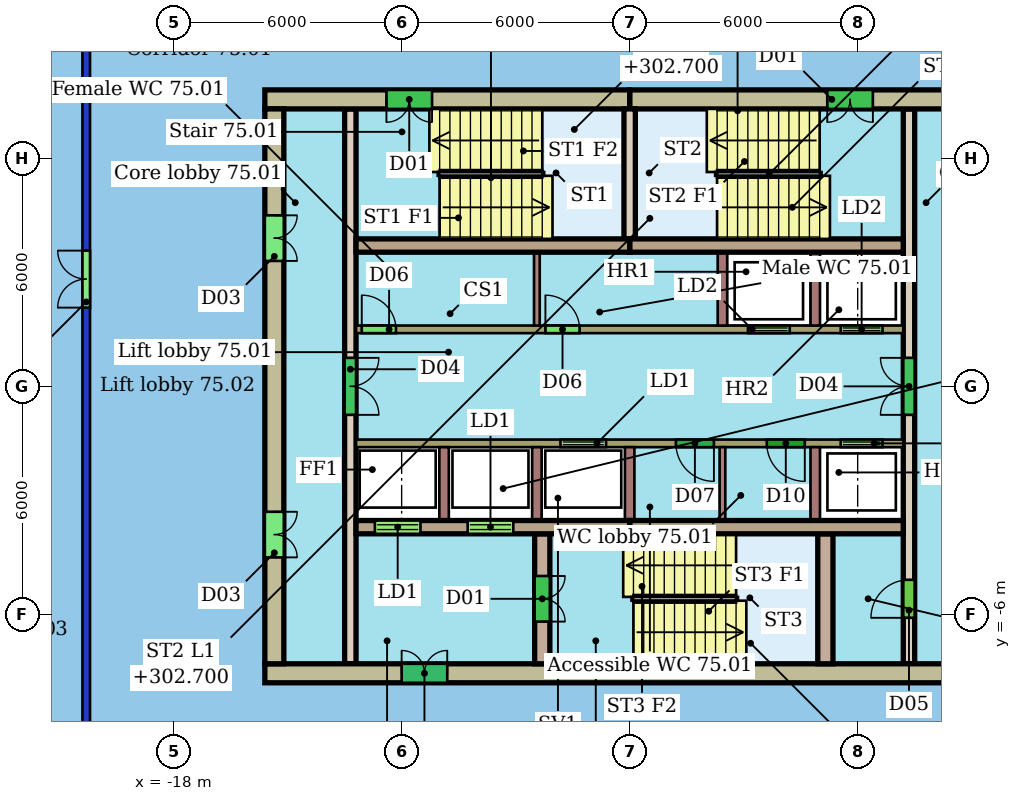
"""IFC4 building model, lengths in metres.
Left out: names, types, materials, properties, quantities, classifications, styles, units other than length and angle.
Written with IfcOpenShell. Run it as: python <this file> out.ifc"""

import sys

from ifc_helpers import new_model, si_unit, direction, frame, frame_2d, origin, place, context, subcontext, project, spatial, rectangle, extrude, element, fill, save


model = new_model("IFC4")
c1 = context("Model", 3, precision=1e-05, world=origin(), true_north=direction((0.0, 1.0)))
c2 = subcontext(c1, "Body", "Model", "MODEL_VIEW")
j1 = project(units=[si_unit("LENGTHUNIT", "METRE"), si_unit("PLANEANGLEUNIT", "RADIAN")], contexts=[c1])
p1 = place(None, origin())
s1 = spatial("IfcSite", under=j1, at=p1, CompositionType="ELEMENT")
p2 = place(p1, origin())
s2 = spatial("IfcBuilding", under=s1, at=p2, CompositionType="ELEMENT")
p3 = place(p2, frame((0.0, 0.0, 300.9)))
s3 = spatial("IfcBuildingStorey", under=s2, at=p3, CompositionType="ELEMENT", Elevation=300.9)
p4 = place(p3, frame((-20.3, -9.8, 0.0), z_axis=(0.0, 0.0, 1.0), x_axis=(0.0, 1.0, 0.0)))
e1 = element("IfcWall", 1, at=p4, inside=s3, PredefinedType="PARTITIONING", context=c2, shape_type="SweptSolid", body=[
    extrude(rectangle(XDim=19.6, YDim=0.2, at=frame_2d((9.8, 0.0))), origin(), (0.0, 0.0, 1.0), 3.05),
])
p5 = place(p4, frame((11.872, 0.0, 0.0)))
e2 = element("IfcOpeningElement", 2, at=p5, cuts=e1, PredefinedType="OPENING", context=c2, shape_type="SweptSolid", body=[
    extrude(rectangle(XDim=1.5, YDim=2.4, at=frame_2d((0.75, 1.2))), frame((0.0, 0.11, 0.0), z_axis=(0.0, -1.0, 0.0), x_axis=(1.0, 0.0, 0.0)), (0.0, 0.0, 1.0), 0.22),
])
p6 = place(p3, frame((3.6, 7.55, 0.0), z_axis=(0.0, 0.0, 1.0), x_axis=(-1.0, 0.0, 0.0)))
e3 = element("IfcWall", 3, at=p6, inside=s3, PredefinedType="SHEAR", context=c2, shape_type="SweptSolid", body=[
    extrude(rectangle(XDim=9.6, YDim=0.5, at=frame_2d((4.8, 0.0))), origin(), (0.0, 0.0, 1.0), 3.3),
])
p7 = place(p6, frame((3.2, 0.0, 0.0)))
e4 = element("IfcOpeningElement", 4, at=p7, cuts=e3, PredefinedType="OPENING", context=c2, shape_type="SweptSolid", body=[
    extrude(rectangle(XDim=1.2, YDim=2.1, at=frame_2d((0.6, 1.05))), frame((0.0, 0.26, 0.0), z_axis=(0.0, -1.0, 0.0), x_axis=(1.0, 0.0, 0.0)), (0.0, 0.0, 1.0), 0.52),
])
p8 = place(p3, frame((-6.0, 7.55, 0.0), z_axis=(0.0, 0.0, 1.0), x_axis=(-1.0, 0.0, 0.0)))
e5 = element("IfcWall", 5, at=p8, inside=s3, PredefinedType="SHEAR", context=c2, shape_type="SweptSolid", body=[
    extrude(rectangle(XDim=9.6, YDim=0.5, at=frame_2d((4.8, 0.0))), origin(), (0.0, 0.0, 1.0), 3.3),
])
p9 = place(p8, frame((5.2, 0.0, 0.0)))
e6 = element("IfcOpeningElement", 6, at=p9, cuts=e5, PredefinedType="OPENING", context=c2, shape_type="SweptSolid", body=[
    extrude(rectangle(XDim=1.2, YDim=2.1, at=frame_2d((0.6, 1.05))), frame((0.0, 0.26, 0.0), z_axis=(0.0, -1.0, 0.0), x_axis=(1.0, 0.0, 0.0)), (0.0, 0.0, 1.0), 0.52),
])
p10 = place(p3, frame((-15.6, -7.55, 0.0), z_axis=(0.0, 0.0, 1.0), x_axis=(1.0, 0.0, 0.0)))
e7 = element("IfcWall", 7, at=p10, inside=s3, PredefinedType="SHEAR", context=c2, shape_type="SweptSolid", body=[
    extrude(rectangle(XDim=19.2, YDim=0.5, at=frame_2d((9.6, 0.0))), origin(), (0.0, 0.0, 1.0), 3.3),
])
p11 = place(p10, frame((3.6, 0.0, 0.0)))
e8 = element("IfcOpeningElement", 8, at=p11, cuts=e7, PredefinedType="OPENING", context=c2, shape_type="SweptSolid", body=[
    extrude(rectangle(XDim=1.2, YDim=2.1, at=frame_2d((0.6, 1.05))), frame((0.0, 0.26, 0.0), z_axis=(0.0, -1.0, 0.0), x_axis=(1.0, 0.0, 0.0)), (0.0, 0.0, 1.0), 0.52),
])
p12 = place(p3, frame((-15.35, 7.3, 0.0), z_axis=(0.0, 0.0, 1.0), x_axis=(0.0, -1.0, 0.0)))
e9 = element("IfcWall", 9, at=p12, inside=s3, PredefinedType="SHEAR", context=c2, shape_type="SweptSolid", body=[
    extrude(rectangle(XDim=14.6, YDim=0.5, at=frame_2d((7.3, 0.0))), origin(), (0.0, 0.0, 1.0), 3.3),
])
p13 = place(p12, frame((10.6, 0.0, 0.0)))
e10 = element("IfcOpeningElement", 10, at=p13, cuts=e9, PredefinedType="OPENING", context=c2, shape_type="SweptSolid", body=[
    extrude(rectangle(XDim=1.2, YDim=2.1, at=frame_2d((0.6, 1.05))), frame((0.0, 0.26, 0.0), z_axis=(0.0, -1.0, 0.0), x_axis=(1.0, 0.0, 0.0)), (0.0, 0.0, 1.0), 0.52),
])
p14 = place(p12, frame((2.8, 0.0, 0.0)))
e11 = element("IfcOpeningElement", 11, at=p14, cuts=e9, PredefinedType="OPENING", context=c2, shape_type="SweptSolid", body=[
    extrude(rectangle(XDim=1.2, YDim=2.1, at=frame_2d((0.6, 1.05))), frame((0.0, 0.26, 0.0), z_axis=(0.0, -1.0, 0.0), x_axis=(1.0, 0.0, 0.0)), (0.0, 0.0, 1.0), 0.52),
])
for number, where, z_axis, x_axis in (
    (12, (-13.2, 3.705, 0.0), (0.0, 0.0, 1.0), (1.0, 0.0, 0.0)),
    (13, (-6.0, 3.705, 0.0), (0.0, 0.0, 1.0), (1.0, 0.0, 0.0)),
):
    element("IfcWall", number, at=place(p3, frame(where, z_axis=z_axis, x_axis=x_axis)), inside=s3, PredefinedType="SHEAR", context=c2, shape_type="SweptSolid", body=[
        extrude(rectangle(XDim=7.2, YDim=0.35, at=frame_2d((3.6, 0.0))), origin(), (0.0, 0.0, 1.0), 3.3),
    ])
p15 = place(p3, frame((-13.2, -3.705, 0.0), z_axis=(0.0, 0.0, 1.0), x_axis=(1.0, 0.0, 0.0)))
e14 = element("IfcWall", 14, at=p15, inside=s3, PredefinedType="SHEAR", context=c2, shape_type="SweptSolid", body=[
    extrude(rectangle(XDim=7.2, YDim=0.35, at=frame_2d((3.6, 0.0))), origin(), (0.0, 0.0, 1.0), 3.3),
])
p16 = place(p15, frame((0.496, 0.0, 0.0)))
e15 = element("IfcOpeningElement", 15, at=p16, cuts=e14, PredefinedType="OPENING", context=c2, shape_type="SweptSolid", body=[
    extrude(rectangle(XDim=1.2, YDim=2.1, at=frame_2d((0.6, 1.05))), frame((0.0, 0.185, 0.0), z_axis=(0.0, -1.0, 0.0), x_axis=(1.0, 0.0, 0.0)), (0.0, 0.0, 1.0), 0.37),
])
p17 = place(p15, frame((2.938, 0.0, 0.0)))
e16 = element("IfcOpeningElement", 16, at=p17, cuts=e14, PredefinedType="OPENING", context=c2, shape_type="SweptSolid", body=[
    extrude(rectangle(XDim=1.2, YDim=2.1, at=frame_2d((0.6, 1.05))), frame((0.0, 0.185, 0.0), z_axis=(0.0, -1.0, 0.0), x_axis=(1.0, 0.0, 0.0)), (0.0, 0.0, 1.0), 0.37),
])
p18 = place(p3, frame((-6.0, -3.705, 0.0), z_axis=(0.0, 0.0, 1.0), x_axis=(1.0, 0.0, 0.0)))
e17 = element("IfcWall", 17, at=p18, inside=s3, PredefinedType="SHEAR", context=c2, shape_type="SweptSolid", body=[
    extrude(rectangle(XDim=7.2, YDim=0.35, at=frame_2d((3.6, 0.0))), origin(), (0.0, 0.0, 1.0), 3.3),
])
p19 = place(p3, frame((-13.35, 7.3, 0.0), z_axis=(0.0, 0.0, 1.0), x_axis=(0.0, -1.0, 0.0)))
e18 = element("IfcWall", 18, at=p19, inside=s3, PredefinedType="SHEAR", context=c2, shape_type="SweptSolid", body=[
    extrude(rectangle(XDim=14.6, YDim=0.3, at=frame_2d((7.3, 0.0))), origin(), (0.0, 0.0, 1.0), 3.3),
])
p20 = place(p19, frame((6.55, 0.0, 0.0)))
e19 = element("IfcOpeningElement", 19, at=p20, cuts=e18, PredefinedType="OPENING", context=c2, shape_type="SweptSolid", body=[
    extrude(rectangle(XDim=1.5, YDim=2.1, at=frame_2d((0.75, 1.05))), frame((0.0, 0.16, 0.0), z_axis=(0.0, -1.0, 0.0), x_axis=(1.0, 0.0, 0.0)), (0.0, 0.0, 1.0), 0.32),
])
p21 = place(p3, frame((1.35, -7.3, 0.0), z_axis=(0.0, 0.0, 1.0), x_axis=(0.0, 1.0, 0.0)))
e20 = element("IfcWall", 20, at=p21, inside=s3, PredefinedType="SHEAR", context=c2, shape_type="SweptSolid", body=[
    extrude(rectangle(XDim=14.6, YDim=0.3, at=frame_2d((7.3, 0.0))), origin(), (0.0, 0.0, 1.0), 3.3),
])
p22 = place(p21, frame((1.21, 0.0, 0.0)))
e21 = element("IfcOpeningElement", 21, at=p22, cuts=e20, PredefinedType="OPENING", context=c2, shape_type="SweptSolid", body=[
    extrude(rectangle(XDim=1.0, YDim=2.1, at=frame_2d((0.5, 1.05))), frame((0.0, 0.16, 0.0), z_axis=(0.0, -1.0, 0.0), x_axis=(1.0, 0.0, 0.0)), (0.0, 0.0, 1.0), 0.32),
])
p23 = place(p21, frame((6.55, 0.0, 0.0)))
e22 = element("IfcOpeningElement", 22, at=p23, cuts=e20, PredefinedType="OPENING", context=c2, shape_type="SweptSolid", body=[
    extrude(rectangle(XDim=1.5, YDim=2.1, at=frame_2d((0.75, 1.05))), frame((0.0, 0.16, 0.0), z_axis=(0.0, -1.0, 0.0), x_axis=(1.0, 0.0, 0.0)), (0.0, 0.0, 1.0), 0.32),
])
p24 = place(p3, frame((-13.2, 1.5, 0.0), z_axis=(0.0, 0.0, 1.0), x_axis=(1.0, 0.0, 0.0)))
e23 = element("IfcWall", 23, at=p24, inside=s3, PredefinedType="SHEAR", context=c2, shape_type="SweptSolid", body=[
    extrude(rectangle(XDim=14.4, YDim=0.2, at=frame_2d((7.2, 0.0))), origin(), (0.0, 0.0, 1.0), 3.3),
])
p25 = place(p24, frame((10.312, 0.0, 0.0)))
e24 = element("IfcOpeningElement", 24, at=p25, cuts=e23, PredefinedType="OPENING", context=c2, shape_type="SweptSolid", body=[
    extrude(rectangle(XDim=1.1, YDim=2.1, at=frame_2d((0.55, 1.05))), frame((0.0, 0.11, 0.0), z_axis=(0.0, -1.0, 0.0), x_axis=(1.0, 0.0, 0.0)), (0.0, 0.0, 1.0), 0.22),
])
p26 = place(p24, frame((12.754, 0.0, 0.0)))
e25 = element("IfcOpeningElement", 25, at=p26, cuts=e23, PredefinedType="OPENING", context=c2, shape_type="SweptSolid", body=[
    extrude(rectangle(XDim=1.1, YDim=2.1, at=frame_2d((0.55, 1.05))), frame((0.0, 0.11, 0.0), z_axis=(0.0, -1.0, 0.0), x_axis=(1.0, 0.0, 0.0)), (0.0, 0.0, 1.0), 0.22),
])
p27 = place(p24, frame((0.15, 0.0, 0.0)))
e26 = element("IfcOpeningElement", 26, at=p27, cuts=e23, PredefinedType="OPENING", context=c2, shape_type="SweptSolid", body=[
    extrude(rectangle(XDim=0.9, YDim=2.1, at=frame_2d((0.45, 1.05))), frame((0.0, 0.11, 0.0), z_axis=(0.0, -1.0, 0.0), x_axis=(1.0, 0.0, 0.0)), (0.0, 0.0, 1.0), 0.22),
])
p28 = place(p24, frame((4.983, 0.0, 0.0)))
e27 = element("IfcOpeningElement", 27, at=p28, cuts=e23, PredefinedType="OPENING", context=c2, shape_type="SweptSolid", body=[
    extrude(rectangle(XDim=0.9, YDim=2.1, at=frame_2d((0.45, 1.05))), frame((0.0, 0.11, 0.0), z_axis=(0.0, -1.0, 0.0), x_axis=(1.0, 0.0, 0.0)), (0.0, 0.0, 1.0), 0.22),
])
p29 = place(p3, frame((1.2, -1.5, 0.0), z_axis=(0.0, 0.0, 1.0), x_axis=(-1.0, 0.0, 0.0)))
e28 = element("IfcWall", 28, at=p29, inside=s3, PredefinedType="SHEAR", context=c2, shape_type="SweptSolid", body=[
    extrude(rectangle(XDim=14.4, YDim=0.2, at=frame_2d((7.2, 0.0))), origin(), (0.0, 0.0, 1.0), 3.3),
])
p30 = place(p29, frame((7.821, 0.0, 0.0)))
e29 = element("IfcOpeningElement", 29, at=p30, cuts=e28, PredefinedType="OPENING", context=c2, shape_type="SweptSolid", body=[
    extrude(rectangle(XDim=1.2, YDim=2.1, at=frame_2d((0.6, 1.05))), frame((0.0, 0.11, 0.0), z_axis=(0.0, -1.0, 0.0), x_axis=(1.0, 0.0, 0.0)), (0.0, 0.0, 1.0), 0.22),
])
p31 = place(p29, frame((0.546, 0.0, 0.0)))
e30 = element("IfcOpeningElement", 30, at=p31, cuts=e28, PredefinedType="OPENING", context=c2, shape_type="SweptSolid", body=[
    extrude(rectangle(XDim=1.1, YDim=2.1, at=frame_2d((0.55, 1.05))), frame((0.0, 0.11, 0.0), z_axis=(0.0, -1.0, 0.0), x_axis=(1.0, 0.0, 0.0)), (0.0, 0.0, 1.0), 0.22),
])
p32 = place(p29, frame((4.983, 0.0, 0.0)))
e31 = element("IfcOpeningElement", 31, at=p32, cuts=e28, PredefinedType="OPENING", context=c2, shape_type="SweptSolid", body=[
    extrude(rectangle(XDim=1.0, YDim=2.1, at=frame_2d((0.5, 1.05))), frame((0.0, 0.11, 0.0), z_axis=(0.0, -1.0, 0.0), x_axis=(1.0, 0.0, 0.0)), (0.0, 0.0, 1.0), 0.22),
])
p33 = place(p29, frame((2.592, 0.0, 0.0)))
e32 = element("IfcOpeningElement", 32, at=p33, cuts=e28, PredefinedType="OPENING", context=c2, shape_type="SweptSolid", body=[
    extrude(rectangle(XDim=1.0, YDim=2.1, at=frame_2d((0.5, 1.05))), frame((0.0, 0.11, 0.0), z_axis=(0.0, -1.0, 0.0), x_axis=(1.0, 0.0, 0.0)), (0.0, 0.0, 1.0), 0.22),
])
p34 = place(p3, frame((-8.3, -3.88, 0.0), z_axis=(0.0, 0.0, 1.0), x_axis=(0.0, -1.0, 0.0)))
e33 = element("IfcWall", 33, at=p34, inside=s3, PredefinedType="SHEAR", context=c2, shape_type="SweptSolid", body=[
    extrude(rectangle(XDim=3.42, YDim=0.4, at=frame_2d((1.71, 0.0))), origin(), (0.0, 0.0, 1.0), 3.3),
])
p35 = place(p34, frame((1.11, 0.0, 0.0)))
e34 = element("IfcOpeningElement", 34, at=p35, cuts=e33, PredefinedType="OPENING", context=c2, shape_type="SweptSolid", body=[
    extrude(rectangle(XDim=1.2, YDim=2.1, at=frame_2d((0.6, 1.05))), frame((0.0, 0.21, 0.0), z_axis=(0.0, -1.0, 0.0), x_axis=(1.0, 0.0, 0.0)), (0.0, 0.0, 1.0), 0.42),
])
p36 = place(p3, frame((-0.85, -3.88, 0.0), z_axis=(0.0, 0.0, 1.0), x_axis=(0.0, -1.0, 0.0)))
e35 = element("IfcWall", 35, at=p36, inside=s3, PredefinedType="SHEAR", context=c2, shape_type="SweptSolid", body=[
    extrude(rectangle(XDim=3.42, YDim=0.4, at=frame_2d((1.71, 0.0))), origin(), (0.0, 0.0, 1.0), 3.3),
])
p37 = place(p3, frame((-6.0, 3.88, 0.0), z_axis=(0.0, 0.0, 1.0), x_axis=(0.0, 1.0, 0.0)))
e36 = element("IfcWall", 36, at=p37, inside=s3, PredefinedType="SHEAR", context=c2, shape_type="SweptSolid", body=[
    extrude(rectangle(XDim=3.42, YDim=0.3, at=frame_2d((1.71, 0.0))), origin(), (0.0, 0.0, 1.0), 3.3),
])
for number, where, z_axis, x_axis in (
    (37, (-3.558, 1.6, 0.0), (0.0, 0.0, 1.0), (0.0, 1.0, 0.0)),
    (38, (-1.117, 1.6, 0.0), (0.0, 0.0, 1.0), (0.0, 1.0, 0.0)),
):
    element("IfcWall", number, at=place(p3, frame(where, z_axis=z_axis, x_axis=x_axis)), inside=s3, PredefinedType="SHEAR", context=c2, shape_type="SweptSolid", body=[
        extrude(rectangle(XDim=1.93, YDim=0.25, at=frame_2d((0.965, 0.0))), origin(), (0.0, 0.0, 1.0), 3.3),
    ])
p38 = place(p3, frame((-8.442, 1.6, 0.0), z_axis=(0.0, 0.0, 1.0), x_axis=(0.0, 1.0, 0.0)))
e39 = element("IfcWall", 39, at=p38, inside=s3, PredefinedType="PARTITIONING", context=c2, shape_type="SweptSolid", body=[
    extrude(rectangle(XDim=1.93, YDim=0.15, at=frame_2d((0.965, 0.0))), origin(), (0.0, 0.0, 1.0), 3.3),
])
for number, where, z_axis, x_axis in (
    (40, (-10.883, -1.6, 0.0), (0.0, 0.0, 1.0), (0.0, -1.0, 0.0)),
    (41, (-8.442, -1.6, 0.0), (0.0, 0.0, 1.0), (0.0, -1.0, 0.0)),
    (42, (-6.0, -1.6, 0.0), (0.0, 0.0, 1.0), (0.0, -1.0, 0.0)),
    (43, (-1.117, -1.6, 0.0), (0.0, 0.0, 1.0), (0.0, -1.0, 0.0)),
):
    element("IfcWall", number, at=place(p3, frame(where, z_axis=z_axis, x_axis=x_axis)), inside=s3, PredefinedType="SHEAR", context=c2, shape_type="SweptSolid", body=[
        extrude(rectangle(XDim=1.93, YDim=0.25, at=frame_2d((0.965, 0.0))), origin(), (0.0, 0.0, 1.0), 3.3),
    ])
p39 = place(p3, frame((-3.558, -1.6, 0.0), z_axis=(0.0, 0.0, 1.0), x_axis=(0.0, -1.0, 0.0)))
e44 = element("IfcWall", 44, at=p39, inside=s3, PredefinedType="PARTITIONING", context=c2, shape_type="SweptSolid", body=[
    extrude(rectangle(XDim=1.93, YDim=0.15, at=frame_2d((0.965, 0.0))), origin(), (0.0, 0.0, 1.0), 3.3),
])
p40 = place(p5, origin())
e45 = element("IfcDoor", 45, at=p40, inside=s3, OperationType="DOUBLE_DOOR_SINGLE_SWING", PredefinedType="DOOR", context=c2, shape_type="SweptSolid", body=[
    extrude(rectangle(XDim=1.5, YDim=2.4, at=frame_2d((0.75, 1.2))), frame((0.0, 0.025, 0.0), z_axis=(0.0, -1.0, 0.0), x_axis=(1.0, 0.0, 0.0)), (0.0, 0.0, 1.0), 0.05),
])
fill(e2, e45)
p41 = place(p7, origin())
e46 = element("IfcDoor", 46, at=p41, inside=s3, OperationType="DOUBLE_DOOR_SINGLE_SWING", PredefinedType="NOTDEFINED", context=c2, shape_type="SweptSolid", body=[
    extrude(rectangle(XDim=1.2, YDim=2.1, at=frame_2d((0.6, 1.05))), frame((0.0, 0.025, 0.0), z_axis=(0.0, -1.0, 0.0), x_axis=(1.0, 0.0, 0.0)), (0.0, 0.0, 1.0), 0.05),
])
fill(e4, e46)
p42 = place(p9, origin())
e47 = element("IfcDoor", 47, at=p42, inside=s3, OperationType="DOUBLE_DOOR_SINGLE_SWING", PredefinedType="NOTDEFINED", context=c2, shape_type="SweptSolid", body=[
    extrude(rectangle(XDim=1.2, YDim=2.1, at=frame_2d((0.6, 1.05))), frame((0.0, 0.025, 0.0), z_axis=(0.0, -1.0, 0.0), x_axis=(1.0, 0.0, 0.0)), (0.0, 0.0, 1.0), 0.05),
])
fill(e6, e47)
p43 = place(p11, origin())
e48 = element("IfcDoor", 48, at=p43, inside=s3, OperationType="DOUBLE_DOOR_SINGLE_SWING", PredefinedType="NOTDEFINED", context=c2, shape_type="SweptSolid", body=[
    extrude(rectangle(XDim=1.2, YDim=2.1, at=frame_2d((0.6, 1.05))), frame((0.0, 0.025, 0.0), z_axis=(0.0, -1.0, 0.0), x_axis=(1.0, 0.0, 0.0)), (0.0, 0.0, 1.0), 0.05),
])
fill(e8, e48)
p44 = place(p13, origin())
e49 = element("IfcDoor", 49, at=p44, inside=s3, OperationType="DOUBLE_DOOR_SINGLE_SWING", PredefinedType="NOTDEFINED", context=c2, shape_type="SweptSolid", body=[
    extrude(rectangle(XDim=1.2, YDim=2.1, at=frame_2d((0.6, 1.05))), frame((0.0, 0.025, 0.0), z_axis=(0.0, -1.0, 0.0), x_axis=(1.0, 0.0, 0.0)), (0.0, 0.0, 1.0), 0.05),
])
fill(e10, e49)
p45 = place(p14, origin())
e50 = element("IfcDoor", 50, at=p45, inside=s3, OperationType="DOUBLE_DOOR_SINGLE_SWING", PredefinedType="NOTDEFINED", context=c2, shape_type="SweptSolid", body=[
    extrude(rectangle(XDim=1.2, YDim=2.1, at=frame_2d((0.6, 1.05))), frame((0.0, 0.025, 0.0), z_axis=(0.0, -1.0, 0.0), x_axis=(1.0, 0.0, 0.0)), (0.0, 0.0, 1.0), 0.05),
])
fill(e11, e50)
p46 = place(p16, origin())
e51 = element("IfcDoor", 51, at=p46, inside=s3, OperationType="DOUBLE_DOOR_SLIDING", PredefinedType="NOTDEFINED", context=c2, shape_type="SweptSolid", body=[
    extrude(rectangle(XDim=1.2, YDim=2.1, at=frame_2d((0.6, 1.05))), frame((0.0, 0.025, 0.0), z_axis=(0.0, -1.0, 0.0), x_axis=(1.0, 0.0, 0.0)), (0.0, 0.0, 1.0), 0.05),
])
fill(e15, e51)
p47 = place(p17, origin())
e52 = element("IfcDoor", 52, at=p47, inside=s3, OperationType="DOUBLE_DOOR_SLIDING", PredefinedType="NOTDEFINED", context=c2, shape_type="SweptSolid", body=[
    extrude(rectangle(XDim=1.2, YDim=2.1, at=frame_2d((0.6, 1.05))), frame((0.0, 0.025, 0.0), z_axis=(0.0, -1.0, 0.0), x_axis=(1.0, 0.0, 0.0)), (0.0, 0.0, 1.0), 0.05),
])
fill(e16, e52)
p48 = place(p20, origin())
e53 = element("IfcDoor", 53, at=p48, inside=s3, OperationType="DOUBLE_DOOR_SINGLE_SWING", PredefinedType="NOTDEFINED", context=c2, shape_type="SweptSolid", body=[
    extrude(rectangle(XDim=1.5, YDim=2.1, at=frame_2d((0.75, 1.05))), frame((0.0, 0.025, 0.0), z_axis=(0.0, -1.0, 0.0), x_axis=(1.0, 0.0, 0.0)), (0.0, 0.0, 1.0), 0.05),
])
fill(e19, e53)
p49 = place(p22, origin())
e54 = element("IfcDoor", 54, at=p49, inside=s3, OperationType="SINGLE_SWING_LEFT", PredefinedType="NOTDEFINED", context=c2, shape_type="SweptSolid", body=[
    extrude(rectangle(XDim=1.0, YDim=2.1, at=frame_2d((0.5, 1.05))), frame((0.0, 0.025, 0.0), z_axis=(0.0, -1.0, 0.0), x_axis=(1.0, 0.0, 0.0)), (0.0, 0.0, 1.0), 0.05),
])
fill(e21, e54)
p50 = place(p23, origin())
e55 = element("IfcDoor", 55, at=p50, inside=s3, OperationType="DOUBLE_DOOR_SINGLE_SWING", PredefinedType="NOTDEFINED", context=c2, shape_type="SweptSolid", body=[
    extrude(rectangle(XDim=1.5, YDim=2.1, at=frame_2d((0.75, 1.05))), frame((0.0, 0.025, 0.0), z_axis=(0.0, -1.0, 0.0), x_axis=(1.0, 0.0, 0.0)), (0.0, 0.0, 1.0), 0.05),
])
fill(e22, e55)
p51 = place(p25, origin())
e56 = element("IfcDoor", 56, at=p51, inside=s3, OperationType="DOUBLE_DOOR_SLIDING", PredefinedType="NOTDEFINED", context=c2, shape_type="SweptSolid", body=[
    extrude(rectangle(XDim=1.1, YDim=2.1, at=frame_2d((0.55, 1.05))), frame((0.0, 0.025, 0.0), z_axis=(0.0, -1.0, 0.0), x_axis=(1.0, 0.0, 0.0)), (0.0, 0.0, 1.0), 0.05),
])
fill(e24, e56)
p52 = place(p26, origin())
e57 = element("IfcDoor", 57, at=p52, inside=s3, OperationType="DOUBLE_DOOR_SLIDING", PredefinedType="NOTDEFINED", context=c2, shape_type="SweptSolid", body=[
    extrude(rectangle(XDim=1.1, YDim=2.1, at=frame_2d((0.55, 1.05))), frame((0.0, 0.025, 0.0), z_axis=(0.0, -1.0, 0.0), x_axis=(1.0, 0.0, 0.0)), (0.0, 0.0, 1.0), 0.05),
])
fill(e25, e57)
p53 = place(p27, origin())
e58 = element("IfcDoor", 58, at=p53, inside=s3, OperationType="SINGLE_SWING_LEFT", PredefinedType="NOTDEFINED", context=c2, shape_type="SweptSolid", body=[
    extrude(rectangle(XDim=0.9, YDim=2.1, at=frame_2d((0.45, 1.05))), frame((0.0, 0.025, 0.0), z_axis=(0.0, -1.0, 0.0), x_axis=(1.0, 0.0, 0.0)), (0.0, 0.0, 1.0), 0.05),
])
fill(e26, e58)
p54 = place(p28, origin())
e59 = element("IfcDoor", 59, at=p54, inside=s3, OperationType="SINGLE_SWING_LEFT", PredefinedType="NOTDEFINED", context=c2, shape_type="SweptSolid", body=[
    extrude(rectangle(XDim=0.9, YDim=2.1, at=frame_2d((0.45, 1.05))), frame((0.0, 0.025, 0.0), z_axis=(0.0, -1.0, 0.0), x_axis=(1.0, 0.0, 0.0)), (0.0, 0.0, 1.0), 0.05),
])
fill(e27, e59)
p55 = place(p30, origin())
e60 = element("IfcDoor", 60, at=p55, inside=s3, OperationType="DOUBLE_DOOR_SLIDING", PredefinedType="NOTDEFINED", context=c2, shape_type="SweptSolid", body=[
    extrude(rectangle(XDim=1.2, YDim=2.1, at=frame_2d((0.6, 1.05))), frame((0.0, 0.025, 0.0), z_axis=(0.0, -1.0, 0.0), x_axis=(1.0, 0.0, 0.0)), (0.0, 0.0, 1.0), 0.05),
])
fill(e29, e60)
p56 = place(p31, origin())
e61 = element("IfcDoor", 61, at=p56, inside=s3, OperationType="DOUBLE_DOOR_SLIDING", PredefinedType="NOTDEFINED", context=c2, shape_type="SweptSolid", body=[
    extrude(rectangle(XDim=1.1, YDim=2.1, at=frame_2d((0.55, 1.05))), frame((0.0, 0.025, 0.0), z_axis=(0.0, -1.0, 0.0), x_axis=(1.0, 0.0, 0.0)), (0.0, 0.0, 1.0), 0.05),
])
fill(e30, e61)
p57 = place(p32, origin())
e62 = element("IfcDoor", 62, at=p57, inside=s3, OperationType="SINGLE_SWING_LEFT", PredefinedType="NOTDEFINED", context=c2, shape_type="SweptSolid", body=[
    extrude(rectangle(XDim=1.0, YDim=2.1, at=frame_2d((0.5, 1.05))), frame((0.0, 0.025, 0.0), z_axis=(0.0, -1.0, 0.0), x_axis=(1.0, 0.0, 0.0)), (0.0, 0.0, 1.0), 0.05),
])
fill(e31, e62)
p58 = place(p33, origin())
e63 = element("IfcDoor", 63, at=p58, inside=s3, OperationType="SINGLE_SWING_LEFT", PredefinedType="NOTDEFINED", context=c2, shape_type="SweptSolid", body=[
    extrude(rectangle(XDim=1.0, YDim=2.1, at=frame_2d((0.5, 1.05))), frame((0.0, 0.025, 0.0), z_axis=(0.0, -1.0, 0.0), x_axis=(1.0, 0.0, 0.0)), (0.0, 0.0, 1.0), 0.05),
])
fill(e32, e63)
p59 = place(p35, origin())
e64 = element("IfcDoor", 64, at=p59, inside=s3, OperationType="DOUBLE_DOOR_SINGLE_SWING", PredefinedType="NOTDEFINED", context=c2, shape_type="SweptSolid", body=[
    extrude(rectangle(XDim=1.2, YDim=2.1, at=frame_2d((0.6, 1.05))), frame((0.0, 0.025, 0.0), z_axis=(0.0, -1.0, 0.0), x_axis=(1.0, 0.0, 0.0)), (0.0, 0.0, 1.0), 0.05),
])
fill(e34, e64)
save(model, sys.argv[1])
